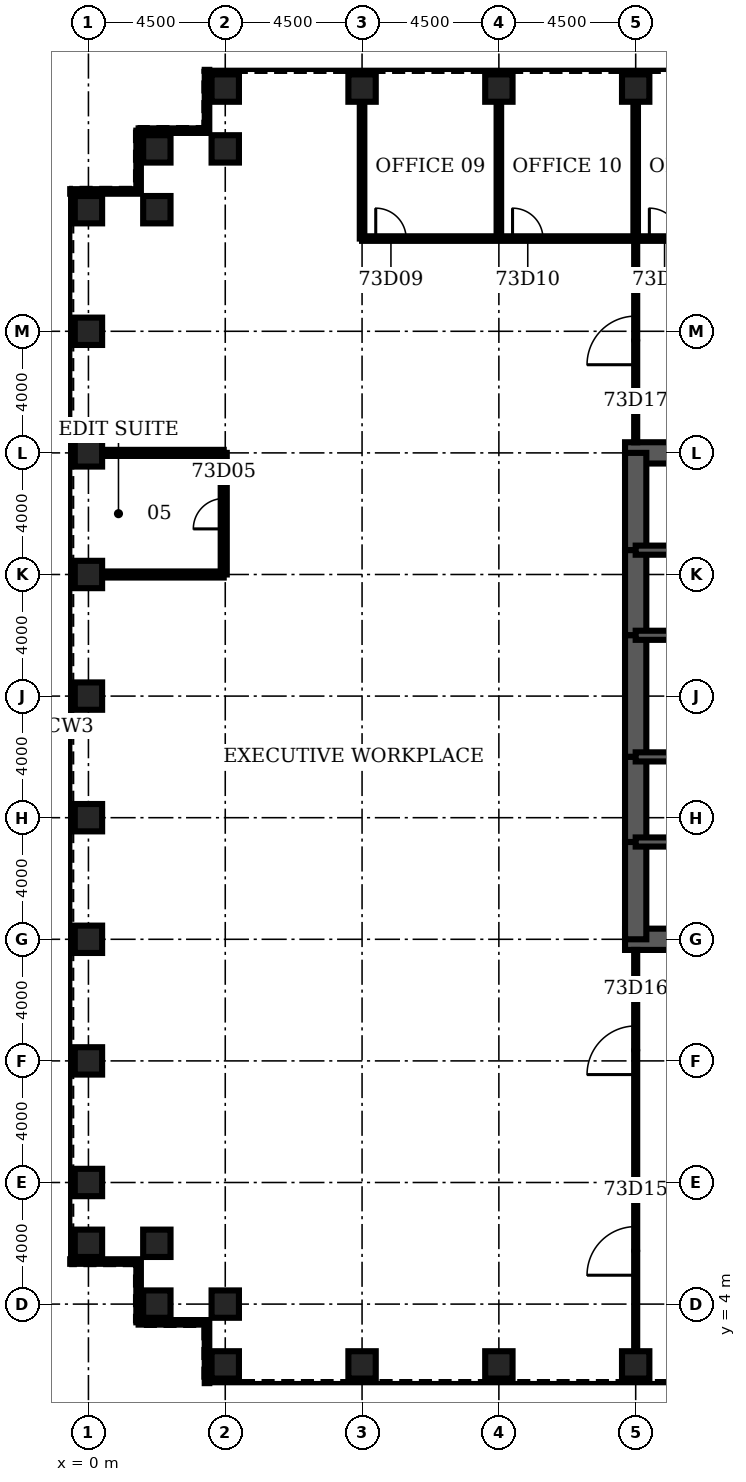
"""IFC4 building model, lengths in metres.
Left out: names, types, materials, properties, quantities, classifications, styles, units other than length and angle.
Written with IfcOpenShell. Run it as: python <this file> out.ifc"""

import sys

from ifc_helpers import new_model, si_unit, direction, frame, frame_2d, origin, origin_2d, place, context, subcontext, project, spatial, rectangle, hollow_rectangle, extrude, element, fill, save


model = new_model("IFC4")
c1 = context("Model", 3, precision=1e-05, world=origin(), true_north=direction((0.0, 1.0)))
c2 = subcontext(c1, "Body", "Model", "MODEL_VIEW")
j1 = project(units=[si_unit("LENGTHUNIT", "METRE"), si_unit("PLANEANGLEUNIT", "RADIAN")], contexts=[c1])
p1 = place(None, origin())
s1 = spatial("IfcSite", under=j1, at=p1, CompositionType="ELEMENT")
p2 = place(p1, origin())
s2 = spatial("IfcBuilding", under=s1, at=p2, CompositionType="ELEMENT")
p3 = place(p2, frame((0.0, 0.0, 321.5)))
s3 = spatial("IfcBuildingStorey", under=s2, at=p3, CompositionType="ELEMENT", Elevation=321.5)
for number, where, z_axis, x_axis in (
    (1, (4.5, 2.0, 0.0), (0.0, 0.0, 1.0), (0.0, 1.0, 0.0)),
    (2, (9.0, 2.0, 0.0), (0.0, 0.0, 1.0), (0.0, 1.0, 0.0)),
    (3, (13.5, 2.0, 0.0), (0.0, 0.0, 1.0), (0.0, 1.0, 0.0)),
    (4, (18.0, 2.0, 0.0), (0.0, 0.0, 1.0), (0.0, 1.0, 0.0)),
    (5, (18.0, 44.0, 0.0), (0.0, 0.0, 1.0), (0.0, 1.0, 0.0)),
    (6, (13.5, 44.0, 0.0), (0.0, 0.0, 1.0), (0.0, 1.0, 0.0)),
    (7, (9.0, 44.0, 0.0), (0.0, 0.0, 1.0), (0.0, 1.0, 0.0)),
    (8, (4.5, 44.0, 0.0), (0.0, 0.0, 1.0), (0.0, 1.0, 0.0)),
    (9, (4.5, 42.0, 0.0), (0.0, 0.0, 1.0), (0.0, 1.0, 0.0)),
    (10, (2.25, 42.0, 0.0), (0.0, 0.0, 1.0), (1.0, 0.0, 0.0)),
    (11, (2.25, 40.0, 0.0), (0.0, 0.0, 1.0), (1.0, 0.0, 0.0)),
    (12, (0.0, 40.0, 0.0), (0.0, 0.0, 1.0), (1.0, 0.0, 0.0)),
    (13, (0.0, 36.0, 0.0), (0.0, 0.0, 1.0), (1.0, 0.0, 0.0)),
    (14, (0.0, 32.0, 0.0), (0.0, 0.0, 1.0), (1.0, 0.0, 0.0)),
    (15, (0.0, 28.0, 0.0), (0.0, 0.0, 1.0), (1.0, 0.0, 0.0)),
    (16, (0.0, 24.0, 0.0), (0.0, 0.0, 1.0), (1.0, 0.0, 0.0)),
    (17, (0.0, 20.0, 0.0), (0.0, 0.0, 1.0), (1.0, 0.0, 0.0)),
    (18, (0.0, 16.0, 0.0), (0.0, 0.0, 1.0), (1.0, 0.0, 0.0)),
    (19, (0.0, 12.0, 0.0), (0.0, 0.0, 1.0), (1.0, 0.0, 0.0)),
    (20, (0.0, 8.0, 0.0), (0.0, 0.0, 1.0), (1.0, 0.0, 0.0)),
    (21, (0.0, 6.0, 0.0), (0.0, 0.0, 1.0), (1.0, 0.0, 0.0)),
    (22, (2.25, 6.0, 0.0), (0.0, 0.0, 1.0), (1.0, 0.0, 0.0)),
    (23, (2.25, 4.0, 0.0), (0.0, 0.0, 1.0), (1.0, 0.0, 0.0)),
    (24, (4.5, 4.0, 0.0), (0.0, 0.0, 1.0), (0.0, 1.0, 0.0)),
):
    element("IfcColumn", number, at=place(p3, frame(where, z_axis=z_axis, x_axis=x_axis)), inside=s3, PredefinedType="COLUMN", context=c2, shape_type="SweptSolid", body=[
        extrude(hollow_rectangle(XDim=0.9, YDim=0.9, WallThickness=0.05, at=origin_2d()), origin(), (0.0, 0.0, 1.0), 4.2),
    ])
for number, where, z_axis, x_axis in (
    (25, (17.65, 16.0, 0.0), (0.0, 0.0, 1.0), (1.0, 0.0, 0.0)),
    (26, (27.0, 32.0, 0.0), (0.0, 0.0, 1.0), (-1.0, 0.0, 0.0)),
):
    element("IfcWall", number, at=place(p3, frame(where, z_axis=z_axis, x_axis=x_axis)), inside=s3, PredefinedType="SHEAR", context=c2, shape_type="SweptSolid", body=[
        extrude(rectangle(XDim=9.35, YDim=0.7, at=frame_2d((4.675, 0.0))), origin(), (0.0, 0.0, 1.0), 4.2),
    ])
p4 = place(p3, frame((18.0, 32.0, 0.0), z_axis=(0.0, 0.0, 1.0), x_axis=(0.0, -1.0, 0.0)))
e27 = element("IfcWall", 27, at=p4, inside=s3, PredefinedType="SHEAR", context=c2, shape_type="SweptSolid", body=[
    extrude(rectangle(XDim=3.2, YDim=0.7, at=frame_2d((1.6, 0.0))), origin(), (0.0, 0.0, 1.0), 4.2),
])
p5 = place(p3, frame((18.0, 28.8, 0.0), z_axis=(0.0, 0.0, 1.0), x_axis=(0.0, -1.0, 0.0)))
e28 = element("IfcWall", 28, at=p5, inside=s3, PredefinedType="SHEAR", context=c2, shape_type="SweptSolid", body=[
    extrude(rectangle(XDim=2.8, YDim=0.7, at=frame_2d((1.4, 0.0))), origin(), (0.0, 0.0, 1.0), 4.2),
])
p6 = place(p5, frame((0.4, 0.0, 0.0)))
e29 = element("IfcOpeningElement", 29, at=p6, cuts=e28, PredefinedType="OPENING", context=c2, shape_type="SweptSolid", body=[
    extrude(rectangle(XDim=1.8, YDim=2.1, at=frame_2d((0.9, 1.05))), frame((0.0, 0.36, 0.0), z_axis=(0.0, -1.0, 0.0), x_axis=(1.0, 0.0, 0.0)), (0.0, 0.0, 1.0), 0.72),
])
p7 = place(p3, frame((18.0, 26.0, 0.0), z_axis=(0.0, 0.0, 1.0), x_axis=(0.0, -1.0, 0.0)))
e30 = element("IfcWall", 30, at=p7, inside=s3, PredefinedType="SHEAR", context=c2, shape_type="SweptSolid", body=[
    extrude(rectangle(XDim=4.0, YDim=0.7, at=frame_2d((2.0, 0.0))), origin(), (0.0, 0.0, 1.0), 4.2),
])
p8 = place(p3, frame((18.0, 22.0, 0.0), z_axis=(0.0, 0.0, 1.0), x_axis=(0.0, -1.0, 0.0)))
e31 = element("IfcWall", 31, at=p8, inside=s3, PredefinedType="SHEAR", context=c2, shape_type="SweptSolid", body=[
    extrude(rectangle(XDim=2.8, YDim=0.7, at=frame_2d((1.4, 0.0))), origin(), (0.0, 0.0, 1.0), 4.2),
])
p9 = place(p8, frame((0.6, 0.0, 0.0)))
e32 = element("IfcOpeningElement", 32, at=p9, cuts=e31, PredefinedType="OPENING", context=c2, shape_type="SweptSolid", body=[
    extrude(rectangle(XDim=1.8, YDim=2.1, at=frame_2d((0.9, 1.05))), frame((0.0, 0.36, 0.0), z_axis=(0.0, -1.0, 0.0), x_axis=(1.0, 0.0, 0.0)), (0.0, 0.0, 1.0), 0.72),
])
p10 = place(p3, frame((18.0, 19.2, 0.0), z_axis=(0.0, 0.0, 1.0), x_axis=(0.0, -1.0, 0.0)))
e33 = element("IfcWall", 33, at=p10, inside=s3, PredefinedType="SHEAR", context=c2, shape_type="SweptSolid", body=[
    extrude(rectangle(XDim=3.2, YDim=0.7, at=frame_2d((1.6, 0.0))), origin(), (0.0, 0.0, 1.0), 4.2),
])
p11 = place(p3, frame((18.0, 19.2, 0.0), z_axis=(0.0, 0.0, 1.0), x_axis=(1.0, 0.0, 0.0)))
e34 = element("IfcWall", 34, at=p11, inside=s3, PredefinedType="SOLIDWALL", context=c2, shape_type="SweptSolid", body=[
    extrude(rectangle(XDim=9.0, YDim=0.3, at=frame_2d((4.5, 0.0))), origin(), (0.0, 0.0, 1.0), 4.2),
])
p12 = place(p11, frame((0.65, 0.0, 0.0)))
e35 = element("IfcOpeningElement", 35, at=p12, cuts=e34, PredefinedType="OPENING", context=c2, shape_type="SweptSolid", body=[
    extrude(rectangle(XDim=1.0, YDim=2.1, at=frame_2d((0.5, 1.05))), frame((0.0, 0.16, 0.0), z_axis=(0.0, -1.0, 0.0), x_axis=(1.0, 0.0, 0.0)), (0.0, 0.0, 1.0), 0.32),
])
p13 = place(p3, frame((18.0, 28.8, 0.0), z_axis=(0.0, 0.0, 1.0), x_axis=(1.0, 0.0, 0.0)))
e36 = element("IfcWall", 36, at=p13, inside=s3, PredefinedType="SOLIDWALL", context=c2, shape_type="SweptSolid", body=[
    extrude(rectangle(XDim=9.0, YDim=0.3, at=frame_2d((4.5, 0.0))), origin(), (0.0, 0.0, 1.0), 4.2),
])
p14 = place(p13, frame((0.65, 0.0, 0.0)))
e37 = element("IfcOpeningElement", 37, at=p14, cuts=e36, PredefinedType="OPENING", context=c2, shape_type="SweptSolid", body=[
    extrude(rectangle(XDim=1.0, YDim=2.1, at=frame_2d((0.5, 1.05))), frame((0.0, 0.16, 0.0), z_axis=(0.0, -1.0, 0.0), x_axis=(1.0, 0.0, 0.0)), (0.0, 0.0, 1.0), 0.32),
])
p15 = place(p3, frame((18.0, 22.0, 0.0), z_axis=(0.0, 0.0, 1.0), x_axis=(1.0, 0.0, 0.0)))
e38 = element("IfcWall", 38, at=p15, inside=s3, PredefinedType="SOLIDWALL", context=c2, shape_type="SweptSolid", body=[
    extrude(rectangle(XDim=6.0, YDim=0.3, at=frame_2d((3.0, 0.0))), origin(), (0.0, 0.0, 1.0), 4.2),
])
p16 = place(p15, frame((2.0, 0.0, 0.0)))
e39 = element("IfcOpeningElement", 39, at=p16, cuts=e38, PredefinedType="OPENING", context=c2, shape_type="SweptSolid", body=[
    extrude(rectangle(XDim=1.0, YDim=2.1, at=frame_2d((0.5, 1.05))), frame((0.0, 0.16, 0.0), z_axis=(0.0, -1.0, 0.0), x_axis=(1.0, 0.0, 0.0)), (0.0, 0.0, 1.0), 0.32),
])
p17 = place(p3, frame((18.0, 26.0, 0.0), z_axis=(0.0, 0.0, 1.0), x_axis=(1.0, 0.0, 0.0)))
e40 = element("IfcWall", 40, at=p17, inside=s3, PredefinedType="SOLIDWALL", context=c2, shape_type="SweptSolid", body=[
    extrude(rectangle(XDim=6.0, YDim=0.3, at=frame_2d((3.0, 0.0))), origin(), (0.0, 0.0, 1.0), 4.2),
])
for number, where, z_axis, x_axis in (
    (41, (0.45, 28.0, 0.0), (0.0, 0.0, 1.0), (1.0, 0.0, 0.0)),
    (42, (0.45, 32.0, 0.0), (0.0, 0.0, 1.0), (1.0, 0.0, 0.0)),
):
    element("IfcWall", number, at=place(p3, frame(where, z_axis=z_axis, x_axis=x_axis)), inside=s3, PredefinedType="PARTITIONING", context=c2, shape_type="SweptSolid", body=[
        extrude(rectangle(XDim=4.0, YDim=0.2, at=frame_2d((2.0, 0.0))), origin(), (0.0, 0.0, 1.0), 3.0),
    ])
p18 = place(p3, frame((9.0, 39.05, 0.0), z_axis=(0.0, 0.0, 1.0), x_axis=(1.0, 0.0, 0.0)))
e43 = element("IfcWall", 43, at=p18, inside=s3, PredefinedType="PARTITIONING", context=c2, shape_type="SweptSolid", body=[
    extrude(rectangle(XDim=27.0, YDim=0.15, at=frame_2d((13.5, 0.0))), origin(), (0.0, 0.0, 1.0), 3.0),
])
p19 = place(p18, frame((0.45, 0.0, 0.0)))
e44 = element("IfcOpeningElement", 44, at=p19, cuts=e43, PredefinedType="OPENING", context=c2, shape_type="SweptSolid", body=[
    extrude(rectangle(XDim=1.0, YDim=2.1, at=frame_2d((0.5, 1.05))), frame((0.0, 0.085, 0.0), z_axis=(0.0, -1.0, 0.0), x_axis=(1.0, 0.0, 0.0)), (0.0, 0.0, 1.0), 0.17),
])
p20 = place(p18, frame((4.95, 0.0, 0.0)))
e45 = element("IfcOpeningElement", 45, at=p20, cuts=e43, PredefinedType="OPENING", context=c2, shape_type="SweptSolid", body=[
    extrude(rectangle(XDim=1.0, YDim=2.1, at=frame_2d((0.5, 1.05))), frame((0.0, 0.085, 0.0), z_axis=(0.0, -1.0, 0.0), x_axis=(1.0, 0.0, 0.0)), (0.0, 0.0, 1.0), 0.17),
])
p21 = place(p18, frame((9.45, 0.0, 0.0)))
e46 = element("IfcOpeningElement", 46, at=p21, cuts=e43, PredefinedType="OPENING", context=c2, shape_type="SweptSolid", body=[
    extrude(rectangle(XDim=1.0, YDim=2.1, at=frame_2d((0.5, 1.05))), frame((0.0, 0.085, 0.0), z_axis=(0.0, -1.0, 0.0), x_axis=(1.0, 0.0, 0.0)), (0.0, 0.0, 1.0), 0.17),
])
p22 = place(p18, frame((13.95, 0.0, 0.0)))
e47 = element("IfcOpeningElement", 47, at=p22, cuts=e43, PredefinedType="OPENING", context=c2, shape_type="SweptSolid", body=[
    extrude(rectangle(XDim=1.0, YDim=2.1, at=frame_2d((0.5, 1.05))), frame((0.0, 0.085, 0.0), z_axis=(0.0, -1.0, 0.0), x_axis=(1.0, 0.0, 0.0)), (0.0, 0.0, 1.0), 0.17),
])
p23 = place(p18, frame((18.45, 0.0, 0.0)))
e48 = element("IfcOpeningElement", 48, at=p23, cuts=e43, PredefinedType="OPENING", context=c2, shape_type="SweptSolid", body=[
    extrude(rectangle(XDim=1.0, YDim=2.1, at=frame_2d((0.5, 1.05))), frame((0.0, 0.085, 0.0), z_axis=(0.0, -1.0, 0.0), x_axis=(1.0, 0.0, 0.0)), (0.0, 0.0, 1.0), 0.17),
])
p24 = place(p18, frame((22.95, 0.0, 0.0)))
e49 = element("IfcOpeningElement", 49, at=p24, cuts=e43, PredefinedType="OPENING", context=c2, shape_type="SweptSolid", body=[
    extrude(rectangle(XDim=1.0, YDim=2.1, at=frame_2d((0.5, 1.05))), frame((0.0, 0.085, 0.0), z_axis=(0.0, -1.0, 0.0), x_axis=(1.0, 0.0, 0.0)), (0.0, 0.0, 1.0), 0.17),
])
p25 = place(p3, frame((4.45, 28.0, 0.0), z_axis=(0.0, 0.0, 1.0), x_axis=(0.0, 1.0, 0.0)))
e50 = element("IfcWall", 50, at=p25, inside=s3, PredefinedType="PARTITIONING", context=c2, shape_type="SweptSolid", body=[
    extrude(rectangle(XDim=4.0, YDim=0.2, at=frame_2d((2.0, 0.0))), origin(), (0.0, 0.0, 1.0), 3.0),
])
p26 = place(p25, frame((1.5, 0.0, 0.0)))
e51 = element("IfcOpeningElement", 51, at=p26, cuts=e50, PredefinedType="OPENING", context=c2, shape_type="SweptSolid", body=[
    extrude(rectangle(XDim=1.0, YDim=2.1, at=frame_2d((0.5, 1.05))), frame((0.0, 0.11, 0.0), z_axis=(0.0, -1.0, 0.0), x_axis=(1.0, 0.0, 0.0)), (0.0, 0.0, 1.0), 0.22),
])
for number, where, z_axis, x_axis in (
    (52, (9.0, 39.05, 0.0), (0.0, 0.0, 1.0), (0.0, 1.0, 0.0)),
    (53, (13.5, 39.05, 0.0), (0.0, 0.0, 1.0), (0.0, 1.0, 0.0)),
):
    element("IfcWall", number, at=place(p3, frame(where, z_axis=z_axis, x_axis=x_axis)), inside=s3, PredefinedType="PARTITIONING", context=c2, shape_type="SweptSolid", body=[
        extrude(rectangle(XDim=4.5, YDim=0.15, at=frame_2d((2.25, 0.0))), origin(), (0.0, 0.0, 1.0), 3.0),
    ])
p27 = place(p3, frame((18.0, 2.45, 0.0), z_axis=(0.0, 0.0, 1.0), x_axis=(0.0, 1.0, 0.0)))
e54 = element("IfcWall", 54, at=p27, inside=s3, PredefinedType="PARTITIONING", context=c2, shape_type="SweptSolid", body=[
    extrude(rectangle(XDim=13.2, YDim=0.1, at=frame_2d((6.6, 0.0))), origin(), (0.0, 0.0, 1.0), 3.0),
])
p28 = place(p27, frame((2.5, 0.0, 0.0)))
e55 = element("IfcOpeningElement", 55, at=p28, cuts=e54, PredefinedType="OPENING", context=c2, shape_type="SweptSolid", body=[
    extrude(rectangle(XDim=1.6, YDim=2.1, at=frame_2d((0.8, 1.05))), frame((0.0, 0.06, 0.0), z_axis=(0.0, -1.0, 0.0), x_axis=(1.0, 0.0, 0.0)), (0.0, 0.0, 1.0), 0.12),
])
p29 = place(p27, frame((9.1, 0.0, 0.0)))
e56 = element("IfcOpeningElement", 56, at=p29, cuts=e54, PredefinedType="OPENING", context=c2, shape_type="SweptSolid", body=[
    extrude(rectangle(XDim=1.6, YDim=2.1, at=frame_2d((0.8, 1.05))), frame((0.0, 0.06, 0.0), z_axis=(0.0, -1.0, 0.0), x_axis=(1.0, 0.0, 0.0)), (0.0, 0.0, 1.0), 0.12),
])
p30 = place(p3, frame((18.0, 32.35, 0.0), z_axis=(0.0, 0.0, 1.0), x_axis=(0.0, 1.0, 0.0)))
e57 = element("IfcWall", 57, at=p30, inside=s3, PredefinedType="PARTITIONING", context=c2, shape_type="SweptSolid", body=[
    extrude(rectangle(XDim=6.7, YDim=0.1, at=frame_2d((3.35, 0.0))), origin(), (0.0, 0.0, 1.0), 3.0),
])
p31 = place(p30, frame((2.55, 0.0, 0.0)))
e58 = element("IfcOpeningElement", 58, at=p31, cuts=e57, PredefinedType="OPENING", context=c2, shape_type="SweptSolid", body=[
    extrude(rectangle(XDim=1.6, YDim=2.1, at=frame_2d((0.8, 1.05))), frame((0.0, 0.06, 0.0), z_axis=(0.0, -1.0, 0.0), x_axis=(1.0, 0.0, 0.0)), (0.0, 0.0, 1.0), 0.12),
])
p32 = place(p3, frame((18.0, 39.05, 0.0), z_axis=(0.0, 0.0, 1.0), x_axis=(0.0, 1.0, 0.0)))
e59 = element("IfcWall", 59, at=p32, inside=s3, PredefinedType="PARTITIONING", context=c2, shape_type="SweptSolid", body=[
    extrude(rectangle(XDim=4.5, YDim=0.15, at=frame_2d((2.25, 0.0))), origin(), (0.0, 0.0, 1.0), 3.0),
])
p33 = place(p3, frame((3.9, 44.6, 0.0), z_axis=(0.0, 0.0, 1.0), x_axis=(0.0, -1.0, 0.0)))
e60 = element("IfcWall", 60, at=p33, inside=s3, PredefinedType="ELEMENTEDWALL", context=c2, shape_type="SweptSolid", body=[
    extrude(rectangle(XDim=2.0, YDim=0.15, at=frame_2d((1.0, 0.0))), origin(), (0.0, 0.0, 1.0), 4.04),
])
p34 = place(p3, frame((3.9, 42.6, 0.0), z_axis=(0.0, 0.0, 1.0), x_axis=(-1.0, 0.0, 0.0)))
e61 = element("IfcWall", 61, at=p34, inside=s3, PredefinedType="ELEMENTEDWALL", context=c2, shape_type="SweptSolid", body=[
    extrude(rectangle(XDim=2.25, YDim=0.15, at=frame_2d((1.125, 0.0))), origin(), (0.0, 0.0, 1.0), 4.04),
])
p35 = place(p3, frame((1.65, 42.6, 0.0), z_axis=(0.0, 0.0, 1.0), x_axis=(0.0, -1.0, 0.0)))
e62 = element("IfcWall", 62, at=p35, inside=s3, PredefinedType="ELEMENTEDWALL", context=c2, shape_type="SweptSolid", body=[
    extrude(rectangle(XDim=2.0, YDim=0.15, at=frame_2d((1.0, 0.0))), origin(), (0.0, 0.0, 1.0), 4.04),
])
for number, where, z_axis, x_axis in (
    (63, (1.65, 40.6, 0.0), (0.0, 0.0, 1.0), (-1.0, 0.0, 0.0)),
    (64, (-0.6, 5.4, 0.0), (0.0, 0.0, 1.0), (1.0, 0.0, 0.0)),
):
    element("IfcWall", number, at=place(p3, frame(where, z_axis=z_axis, x_axis=x_axis)), inside=s3, PredefinedType="ELEMENTEDWALL", context=c2, shape_type="SweptSolid", body=[
        extrude(rectangle(XDim=2.25, YDim=0.15, at=frame_2d((1.125, 0.0))), origin(), (0.0, 0.0, 1.0), 4.04),
    ])
p36 = place(p3, frame((1.65, 5.4, 0.0), z_axis=(0.0, 0.0, 1.0), x_axis=(0.0, -1.0, 0.0)))
e65 = element("IfcWall", 65, at=p36, inside=s3, PredefinedType="ELEMENTEDWALL", context=c2, shape_type="SweptSolid", body=[
    extrude(rectangle(XDim=2.0, YDim=0.15, at=frame_2d((1.0, 0.0))), origin(), (0.0, 0.0, 1.0), 4.04),
])
p37 = place(p3, frame((1.65, 3.4, 0.0), z_axis=(0.0, 0.0, 1.0), x_axis=(1.0, 0.0, 0.0)))
e66 = element("IfcWall", 66, at=p37, inside=s3, PredefinedType="ELEMENTEDWALL", context=c2, shape_type="SweptSolid", body=[
    extrude(rectangle(XDim=2.25, YDim=0.15, at=frame_2d((1.125, 0.0))), origin(), (0.0, 0.0, 1.0), 4.04),
])
p38 = place(p3, frame((3.9, 3.4, 0.0), z_axis=(0.0, 0.0, 1.0), x_axis=(0.0, -1.0, 0.0)))
e67 = element("IfcWall", 67, at=p38, inside=s3, PredefinedType="ELEMENTEDWALL", context=c2, shape_type="SweptSolid", body=[
    extrude(rectangle(XDim=2.0, YDim=0.15, at=frame_2d((1.0, 0.0))), origin(), (0.0, 0.0, 1.0), 4.04),
])
p39 = place(p26, origin())
e68 = element("IfcDoor", 68, at=p39, inside=s3, OperationType="SINGLE_SWING_LEFT", PredefinedType="DOOR", context=c2, shape_type="SweptSolid", body=[
    extrude(rectangle(XDim=1.0, YDim=2.1, at=frame_2d((0.5, 1.05))), frame((0.0, 0.025, 0.0), z_axis=(0.0, -1.0, 0.0), x_axis=(1.0, 0.0, 0.0)), (0.0, 0.0, 1.0), 0.05),
])
fill(e51, e68)
p40 = place(p19, origin())
e69 = element("IfcDoor", 69, at=p40, inside=s3, OperationType="SINGLE_SWING_LEFT", PredefinedType="DOOR", context=c2, shape_type="SweptSolid", body=[
    extrude(rectangle(XDim=1.0, YDim=2.1, at=frame_2d((0.5, 1.05))), frame((0.0, 0.025, 0.0), z_axis=(0.0, -1.0, 0.0), x_axis=(1.0, 0.0, 0.0)), (0.0, 0.0, 1.0), 0.05),
])
fill(e44, e69)
p41 = place(p20, origin())
e70 = element("IfcDoor", 70, at=p41, inside=s3, OperationType="SINGLE_SWING_LEFT", PredefinedType="DOOR", context=c2, shape_type="SweptSolid", body=[
    extrude(rectangle(XDim=1.0, YDim=2.1, at=frame_2d((0.5, 1.05))), frame((0.0, 0.025, 0.0), z_axis=(0.0, -1.0, 0.0), x_axis=(1.0, 0.0, 0.0)), (0.0, 0.0, 1.0), 0.05),
])
fill(e45, e70)
p42 = place(p21, origin())
e71 = element("IfcDoor", 71, at=p42, inside=s3, OperationType="SINGLE_SWING_LEFT", PredefinedType="DOOR", context=c2, shape_type="SweptSolid", body=[
    extrude(rectangle(XDim=1.0, YDim=2.1, at=frame_2d((0.5, 1.05))), frame((0.0, 0.025, 0.0), z_axis=(0.0, -1.0, 0.0), x_axis=(1.0, 0.0, 0.0)), (0.0, 0.0, 1.0), 0.05),
])
fill(e46, e71)
p43 = place(p28, origin())
e72 = element("IfcDoor", 72, at=p43, inside=s3, OperationType="SINGLE_SWING_LEFT", PredefinedType="DOOR", context=c2, shape_type="SweptSolid", body=[
    extrude(rectangle(XDim=1.6, YDim=2.1, at=frame_2d((0.8, 1.05))), frame((0.0, 0.025, 0.0), z_axis=(0.0, -1.0, 0.0), x_axis=(1.0, 0.0, 0.0)), (0.0, 0.0, 1.0), 0.05),
])
fill(e55, e72)
p44 = place(p29, origin())
e73 = element("IfcDoor", 73, at=p44, inside=s3, OperationType="SINGLE_SWING_LEFT", PredefinedType="DOOR", context=c2, shape_type="SweptSolid", body=[
    extrude(rectangle(XDim=1.6, YDim=2.1, at=frame_2d((0.8, 1.05))), frame((0.0, 0.025, 0.0), z_axis=(0.0, -1.0, 0.0), x_axis=(1.0, 0.0, 0.0)), (0.0, 0.0, 1.0), 0.05),
])
fill(e56, e73)
p45 = place(p31, origin())
e74 = element("IfcDoor", 74, at=p45, inside=s3, OperationType="SINGLE_SWING_LEFT", PredefinedType="DOOR", context=c2, shape_type="SweptSolid", body=[
    extrude(rectangle(XDim=1.6, YDim=2.1, at=frame_2d((0.8, 1.05))), frame((0.0, 0.025, 0.0), z_axis=(0.0, -1.0, 0.0), x_axis=(1.0, 0.0, 0.0)), (0.0, 0.0, 1.0), 0.05),
])
fill(e58, e74)
p46 = place(p12, origin())
e75 = element("IfcDoor", 75, at=p46, inside=s3, OperationType="SINGLE_SWING_LEFT", PredefinedType="DOOR", context=c2, shape_type="SweptSolid", body=[
    extrude(rectangle(XDim=1.0, YDim=2.1, at=frame_2d((0.5, 1.05))), frame((0.0, 0.025, 0.0), z_axis=(0.0, -1.0, 0.0), x_axis=(1.0, 0.0, 0.0)), (0.0, 0.0, 1.0), 0.05),
])
fill(e35, e75)
p47 = place(p14, origin())
e76 = element("IfcDoor", 76, at=p47, inside=s3, OperationType="SINGLE_SWING_LEFT", PredefinedType="DOOR", context=c2, shape_type="SweptSolid", body=[
    extrude(rectangle(XDim=1.0, YDim=2.1, at=frame_2d((0.5, 1.05))), frame((0.0, 0.025, 0.0), z_axis=(0.0, -1.0, 0.0), x_axis=(1.0, 0.0, 0.0)), (0.0, 0.0, 1.0), 0.05),
])
fill(e37, e76)
p48 = place(p9, origin())
e77 = element("IfcDoor", 77, at=p48, inside=s3, OperationType="SINGLE_SWING_LEFT", PredefinedType="DOOR", context=c2, shape_type="SweptSolid", body=[
    extrude(rectangle(XDim=1.8, YDim=2.1, at=frame_2d((0.9, 1.05))), frame((0.0, 0.35, 0.0), z_axis=(0.0, -1.0, 0.0), x_axis=(1.0, 0.0, 0.0)), (0.0, 0.0, 1.0), 0.699),
])
fill(e32, e77)
p49 = place(p6, origin())
e78 = element("IfcDoor", 78, at=p49, inside=s3, OperationType="SINGLE_SWING_LEFT", PredefinedType="DOOR", context=c2, shape_type="SweptSolid", body=[
    extrude(rectangle(XDim=1.8, YDim=2.1, at=frame_2d((0.9, 1.05))), frame((0.0, 0.35, 0.0), z_axis=(0.0, -1.0, 0.0), x_axis=(1.0, 0.0, 0.0)), (0.0, 0.0, 1.0), 0.699),
])
fill(e29, e78)
save(model, sys.argv[1])
